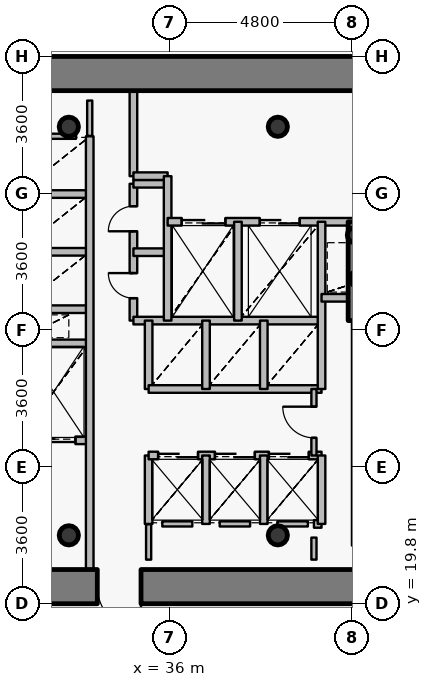
"""IFC4 building model, lengths in metres.
Left out: names, types, materials, properties, quantities, classifications, styles, units other than length and angle.
Written with IfcOpenShell. Run it as: python <this file> out.ifc"""

import sys

from ifc_helpers import new_model, si_unit, direction, frame, frame_2d, origin, origin_2d, place, context, subcontext, project, spatial, rectangle, hollow_circle, extrude, source, transform, mapped, element, fill, save


model = new_model("IFC4")
c1 = context("Model", 3, precision=1e-05, world=origin(), true_north=direction((0.0, 1.0)))
c2 = subcontext(c1, "Body", "Model", "MODEL_VIEW")
j1 = project(units=[si_unit("LENGTHUNIT", "METRE"), si_unit("PLANEANGLEUNIT", "RADIAN")], contexts=[c1])
p1 = place(None, origin())
s1 = spatial("IfcSite", under=j1, at=p1, CompositionType="ELEMENT")
p2 = place(p1, origin())
s2 = spatial("IfcBuilding", under=s1, at=p2, CompositionType="ELEMENT")
p3 = place(p2, frame((0.0, 0.0, 70.2)))
s3 = spatial("IfcBuildingStorey", under=s2, at=p3, CompositionType="ELEMENT", Elevation=70.2)
for number, where, z_axis, x_axis in (
    (1, (33.35, 21.6, 0.0), (0.0, 0.0, 1.0), (1.0, 0.0, 0.0)),
    (2, (38.85, 21.6, 0.0), (0.0, 0.0, 1.0), (1.0, 0.0, 0.0)),
    (3, (38.85, 32.35, 0.0), (0.0, 0.0, 1.0), (1.0, 0.0, 0.0)),
    (4, (33.35, 32.35, 0.0), (0.0, 0.0, 1.0), (1.0, 0.0, 0.0)),
):
    element("IfcColumn", number, at=place(p3, frame(where, z_axis=z_axis, x_axis=x_axis)), inside=s3, PredefinedType="COLUMN", context=c2, shape_type="SweptSolid", body=[
        extrude(hollow_circle(Radius=0.254, WallThickness=0.02, at=origin_2d()), origin(), (0.0, 0.0, 1.0), 4.2),
    ])
for number, where, z_axis, x_axis in (
    (5, (40.95, 28.35, 0.0), (0.0, 0.0, 1.0), (1.0, 0.0, 0.0)),
    (6, (40.88, 29.5, 0.0), (0.0, 0.0, 1.0), (1.0, 0.0, 0.0)),
):
    element("IfcColumn", number, at=place(p3, frame(where, z_axis=z_axis, x_axis=x_axis)), inside=s3, PredefinedType="COLUMN", context=c2, shape_type="SweptSolid", body=[
        extrude(hollow_circle(Radius=0.203, WallThickness=0.016, at=origin_2d()), origin(), (0.0, 0.0, 1.0), 4.2),
    ])
p4 = place(p3, frame((26.75, 33.75, 0.0), z_axis=(0.0, 0.0, 1.0), x_axis=(1.0, 0.0, 0.0)))
e7 = element("IfcWall", 7, at=p4, inside=s3, PredefinedType="SHEAR", context=c2, shape_type="SweptSolid", body=[
    extrude(rectangle(XDim=18.5, YDim=0.9, at=frame_2d((9.25, 0.0))), origin(), (0.0, 0.0, 1.0), 3.4),
])
p5 = place(p3, frame((45.25, 20.25, 0.0), z_axis=(0.0, 0.0, 1.0), x_axis=(-1.0, 0.0, 0.0)))
e8 = element("IfcWall", 8, at=p5, inside=s3, PredefinedType="SHEAR", context=c2, shape_type="SweptSolid", body=[
    extrude(rectangle(XDim=18.5, YDim=0.9, at=frame_2d((9.25, 0.0))), origin(), (0.0, 0.0, 1.0), 3.4),
])
p6 = place(p5, frame((10.0, 0.0, 0.0)))
e9 = element("IfcOpeningElement", 9, at=p6, cuts=e8, PredefinedType="OPENING", context=c2, shape_type="SweptSolid", body=[
    extrude(rectangle(XDim=1.15, YDim=2.15, at=origin_2d()), frame((0.575, 0.46, 1.075), z_axis=(0.0, -1.0, 0.0), x_axis=(1.0, 0.0, 0.0)), (0.0, 0.0, 1.0), 0.92),
])
p7 = place(p3, frame((40.9, 27.25, 0.0), z_axis=(0.0, 0.0, 1.0), x_axis=(0.0, 1.0, 0.0)))
e10 = element("IfcWall", 10, at=p7, inside=s3, PredefinedType="SHEAR", context=c2, shape_type="SweptSolid", body=[
    extrude(rectangle(XDim=2.6, YDim=0.4, at=frame_2d((1.3, 0.0))), origin(), (0.0, 0.0, 1.0), 3.55),
])
p8 = place(p3, frame((32.0, 24.1, 0.0), z_axis=(0.0, 0.0, 1.0), x_axis=(1.0, 0.0, 0.0)))
e11 = element("IfcWall", 11, at=p8, inside=s3, PredefinedType="PARTITIONING", context=c2, shape_type="SweptSolid", body=[
    extrude(rectangle(XDim=1.9, YDim=0.2, at=frame_2d((0.95, 0.0))), origin(), (0.0, 0.0, 1.0), 3.535),
])
p9 = place(p8, frame((0.375, 0.0, 0.0)))
e12 = element("IfcOpeningElement", 12, at=p9, cuts=e11, PredefinedType="OPENING", context=c2, shape_type="SweptSolid", body=[
    extrude(rectangle(XDim=1.15, YDim=2.15, at=origin_2d()), frame((0.575, 0.11, 1.075), z_axis=(0.0, -1.0, 0.0), x_axis=(1.0, 0.0, 0.0)), (0.0, 0.0, 1.0), 0.22),
])
for number, where, z_axis, x_axis in (
    (13, (32.0, 26.65, 0.0), (0.0, 0.0, 1.0), (1.0, 0.0, 0.0)),
    (14, (32.0, 27.55, 0.0), (0.0, 0.0, 1.0), (1.0, 0.0, 0.0)),
    (15, (32.0, 29.06, 0.0), (0.0, 0.0, 1.0), (1.0, 0.0, 0.0)),
    (16, (32.0, 30.58, 0.0), (0.0, 0.0, 1.0), (1.0, 0.0, 0.0)),
):
    element("IfcWall", number, at=place(p3, frame(where, z_axis=z_axis, x_axis=x_axis)), inside=s3, PredefinedType="PARTITIONING", context=c2, shape_type="SweptSolid", body=[
        extrude(rectangle(XDim=1.9, YDim=0.2, at=frame_2d((0.95, 0.0))), origin(), (0.0, 0.0, 1.0), 3.535),
    ])
p10 = place(p3, frame((33.9, 20.7, 0.0), z_axis=(0.0, 0.0, 1.0), x_axis=(0.0, 1.0, 0.0)))
e17 = element("IfcWall", 17, at=p10, inside=s3, PredefinedType="PARTITIONING", context=c2, shape_type="SweptSolid", body=[
    extrude(rectangle(XDim=11.4, YDim=0.2, at=frame_2d((5.7, 0.0))), origin(), (0.0, 0.0, 1.0), 3.535),
])
p11 = place(p3, frame((35.05, 27.25, 0.0), z_axis=(0.0, 0.0, 1.0), x_axis=(0.0, 1.0, 0.0)))
e18 = element("IfcWall", 18, at=p11, inside=s3, PredefinedType="PARTITIONING", context=c2, shape_type="SweptSolid", body=[
    extrude(rectangle(XDim=3.6, YDim=0.2, at=frame_2d((1.8, 0.0))), origin(), (0.0, 0.0, 1.0), 3.95),
])
p12 = place(p11, frame((0.59, 0.0, 0.0)))
e19 = element("IfcOpeningElement", 19, at=p12, cuts=e18, PredefinedType="OPENING", context=c2, shape_type="SweptSolid", body=[
    extrude(rectangle(XDim=0.66, YDim=2.05, at=origin_2d()), frame((0.33, 0.11, 1.025), z_axis=(0.0, -1.0, 0.0), x_axis=(1.0, 0.0, 0.0)), (0.0, 0.0, 1.0), 0.22),
])
p13 = place(p11, frame((2.35, 0.0, 0.0)))
e20 = element("IfcOpeningElement", 20, at=p13, cuts=e18, PredefinedType="OPENING", context=c2, shape_type="SweptSolid", body=[
    extrude(rectangle(XDim=0.66, YDim=2.05, at=origin_2d()), frame((0.33, 0.11, 1.025), z_axis=(0.0, -1.0, 0.0), x_axis=(1.0, 0.0, 0.0)), (0.0, 0.0, 1.0), 0.22),
])
p14 = place(p3, frame((35.05, 27.25, 0.0), z_axis=(0.0, 0.0, 1.0), x_axis=(1.0, 0.0, 0.0)))
e21 = element("IfcWall", 21, at=p14, inside=s3, PredefinedType="PARTITIONING", context=c2, shape_type="SweptSolid", body=[
    extrude(rectangle(XDim=4.95, YDim=0.2, at=frame_2d((2.475, 0.0))), origin(), (0.0, 0.0, 1.0), 3.535),
])
for number, where, z_axis, x_axis in (
    (22, (35.05, 29.05, 0.0), (0.0, 0.0, 1.0), (1.0, 0.0, 0.0)),
    (23, (35.05, 30.85, 0.0), (0.0, 0.0, 1.0), (1.0, 0.0, 0.0)),
):
    element("IfcWall", number, at=place(p3, frame(where, z_axis=z_axis, x_axis=x_axis)), inside=s3, PredefinedType="PARTITIONING", context=c2, shape_type="SweptSolid", body=[
        extrude(rectangle(XDim=0.9, YDim=0.2, at=frame_2d((0.45, 0.0))), origin(), (0.0, 0.0, 1.0), 3.95),
    ])
p15 = place(p3, frame((35.05, 31.05, 0.0), z_axis=(0.0, 0.0, 1.0), x_axis=(0.0, 1.0, 0.0)))
e24 = element("IfcWall", 24, at=p15, inside=s3, PredefinedType="PARTITIONING", context=c2, shape_type="SweptSolid", body=[
    extrude(rectangle(XDim=2.25, YDim=0.2, at=frame_2d((1.125, 0.0))), origin(), (0.0, 0.0, 1.0), 3.535),
])
p16 = place(p3, frame((35.05, 31.05, 0.0), z_axis=(0.0, 0.0, 1.0), x_axis=(1.0, 0.0, 0.0)))
e25 = element("IfcWall", 25, at=p16, inside=s3, PredefinedType="PARTITIONING", context=c2, shape_type="SweptSolid", body=[
    extrude(rectangle(XDim=0.9, YDim=0.2, at=frame_2d((0.45, 0.0))), origin(), (0.0, 0.0, 1.0), 3.95),
])
p17 = place(p3, frame((35.45, 21.9, 0.0), z_axis=(0.0, 0.0, 1.0), x_axis=(0.0, 1.0, 0.0)))
e26 = element("IfcWall", 26, at=p17, inside=s3, PredefinedType="PARTITIONING", context=c2, shape_type="SweptSolid", body=[
    extrude(rectangle(XDim=1.8, YDim=0.2, at=frame_2d((0.9, 0.0))), origin(), (0.0, 0.0, 1.0), 3.95),
])
p18 = place(p3, frame((35.45, 23.7, 0.0), z_axis=(0.0, 0.0, 1.0), x_axis=(1.0, 0.0, 0.0)))
e27 = element("IfcWall", 27, at=p18, inside=s3, PredefinedType="PARTITIONING", context=c2, shape_type="SweptSolid", body=[
    extrude(rectangle(XDim=4.55, YDim=0.2, at=frame_2d((2.275, 0.0))), origin(), (0.0, 0.0, 1.0), 3.535),
])
p19 = place(p18, frame((0.25, 0.0, 0.0)))
e28 = element("IfcOpeningElement", 28, at=p19, cuts=e27, PredefinedType="OPENING", context=c2, shape_type="SweptSolid", body=[
    extrude(rectangle(XDim=1.05, YDim=2.15, at=origin_2d()), frame((0.525, 0.11, 1.075), z_axis=(0.0, -1.0, 0.0), x_axis=(1.0, 0.0, 0.0)), (0.0, 0.0, 1.0), 0.22),
])
p20 = place(p18, frame((1.745, 0.0, 0.0)))
e29 = element("IfcOpeningElement", 29, at=p20, cuts=e27, PredefinedType="OPENING", context=c2, shape_type="SweptSolid", body=[
    extrude(rectangle(XDim=1.05, YDim=2.15, at=origin_2d()), frame((0.525, 0.11, 1.075), z_axis=(0.0, -1.0, 0.0), x_axis=(1.0, 0.0, 0.0)), (0.0, 0.0, 1.0), 0.22),
])
p21 = place(p18, frame((3.165, 0.0, 0.0)))
e30 = element("IfcOpeningElement", 30, at=p21, cuts=e27, PredefinedType="OPENING", context=c2, shape_type="SweptSolid", body=[
    extrude(rectangle(XDim=1.05, YDim=2.15, at=origin_2d()), frame((0.525, 0.11, 1.075), z_axis=(0.0, -1.0, 0.0), x_axis=(1.0, 0.0, 0.0)), (0.0, 0.0, 1.0), 0.22),
])
p22 = place(p3, frame((35.45, 25.45, 0.0), z_axis=(0.0, 0.0, 1.0), x_axis=(0.0, 1.0, 0.0)))
e31 = element("IfcWall", 31, at=p22, inside=s3, PredefinedType="PARTITIONING", context=c2, shape_type="SweptSolid", body=[
    extrude(rectangle(XDim=1.8, YDim=0.2, at=frame_2d((0.9, 0.0))), origin(), (0.0, 0.0, 1.0), 3.95),
])
p23 = place(p3, frame((35.45, 25.45, 0.0), z_axis=(0.0, 0.0, 1.0), x_axis=(1.0, 0.0, 0.0)))
e32 = element("IfcWall", 32, at=p23, inside=s3, PredefinedType="PARTITIONING", context=c2, shape_type="SweptSolid", body=[
    extrude(rectangle(XDim=4.55, YDim=0.2, at=frame_2d((2.275, 0.0))), origin(), (0.0, 0.0, 1.0), 3.535),
])
p24 = place(p3, frame((35.95, 27.25, 0.0), z_axis=(0.0, 0.0, 1.0), x_axis=(0.0, 1.0, 0.0)))
e33 = element("IfcWall", 33, at=p24, inside=s3, PredefinedType="PARTITIONING", context=c2, shape_type="SweptSolid", body=[
    extrude(rectangle(XDim=3.8, YDim=0.2, at=frame_2d((1.9, 0.0))), origin(), (0.0, 0.0, 1.0), 3.95),
])
p25 = place(p3, frame((35.95, 29.85, 0.0), z_axis=(0.0, 0.0, 1.0), x_axis=(1.0, 0.0, 0.0)))
e34 = element("IfcWall", 34, at=p25, inside=s3, PredefinedType="PARTITIONING", context=c2, shape_type="SweptSolid", body=[
    extrude(rectangle(XDim=8.49, YDim=0.2, at=frame_2d((4.245, 0.0))), origin(), (0.0, 0.0, 1.0), 3.535),
])
p26 = place(p25, frame((6.1, 0.0, 0.0)))
e35 = element("IfcOpeningElement", 35, at=p26, cuts=e34, PredefinedType="OPENING", context=c2, shape_type="SweptSolid", body=[
    extrude(rectangle(XDim=1.2, YDim=2.15, at=origin_2d()), frame((0.6, 0.11, 1.075), z_axis=(0.0, -1.0, 0.0), x_axis=(1.0, 0.0, 0.0)), (0.0, 0.0, 1.0), 0.22),
])
p27 = place(p25, frame((0.37, 0.0, 0.0)))
e36 = element("IfcOpeningElement", 36, at=p27, cuts=e34, PredefinedType="OPENING", context=c2, shape_type="SweptSolid", body=[
    extrude(rectangle(XDim=1.15, YDim=2.15, at=origin_2d()), frame((0.575, 0.11, 1.075), z_axis=(0.0, -1.0, 0.0), x_axis=(1.0, 0.0, 0.0)), (0.0, 0.0, 1.0), 0.22),
])
p28 = place(p25, frame((2.425, 0.0, 0.0)))
e37 = element("IfcOpeningElement", 37, at=p28, cuts=e34, PredefinedType="OPENING", context=c2, shape_type="SweptSolid", body=[
    extrude(rectangle(XDim=1.05, YDim=2.15, at=origin_2d()), frame((0.525, 0.11, 1.075), z_axis=(0.0, -1.0, 0.0), x_axis=(1.0, 0.0, 0.0)), (0.0, 0.0, 1.0), 0.22),
])
for number, where, z_axis, x_axis in (
    (38, (36.96, 21.9, 0.0), (0.0, 0.0, 1.0), (0.0, 1.0, 0.0)),
    (39, (36.96, 25.45, 0.0), (0.0, 0.0, 1.0), (0.0, 1.0, 0.0)),
):
    element("IfcWall", number, at=place(p3, frame(where, z_axis=z_axis, x_axis=x_axis)), inside=s3, PredefinedType="PARTITIONING", context=c2, shape_type="SweptSolid", body=[
        extrude(rectangle(XDim=1.8, YDim=0.2, at=frame_2d((0.9, 0.0))), origin(), (0.0, 0.0, 1.0), 3.95),
    ])
p29 = place(p3, frame((37.8, 27.25, 0.0), z_axis=(0.0, 0.0, 1.0), x_axis=(0.0, 1.0, 0.0)))
e40 = element("IfcWall", 40, at=p29, inside=s3, PredefinedType="PARTITIONING", context=c2, shape_type="SweptSolid", body=[
    extrude(rectangle(XDim=2.6, YDim=0.2, at=frame_2d((1.3, 0.0))), origin(), (0.0, 0.0, 1.0), 3.95),
])
for number, where, z_axis, x_axis in (
    (41, (38.48, 21.9, 0.0), (0.0, 0.0, 1.0), (0.0, 1.0, 0.0)),
    (42, (38.48, 25.45, 0.0), (0.0, 0.0, 1.0), (0.0, 1.0, 0.0)),
):
    element("IfcWall", number, at=place(p3, frame(where, z_axis=z_axis, x_axis=x_axis)), inside=s3, PredefinedType="PARTITIONING", context=c2, shape_type="SweptSolid", body=[
        extrude(rectangle(XDim=1.8, YDim=0.2, at=frame_2d((0.9, 0.0))), origin(), (0.0, 0.0, 1.0), 3.95),
    ])
p30 = place(p3, frame((39.8, 21.9, 0.0), z_axis=(0.0, 0.0, 1.0), x_axis=(1.0, 0.0, 0.0)))
e43 = element("IfcWall", 43, at=p30, inside=s3, PredefinedType="PARTITIONING", context=c2, shape_type="SweptSolid", body=[
    extrude(rectangle(XDim=0.2, YDim=0.2, at=frame_2d((0.1, 0.0))), origin(), (0.0, 0.0, 1.0), 3.95),
])
p31 = place(p3, frame((39.8, 23.7, 0.0), z_axis=(0.0, 0.0, 1.0), x_axis=(0.0, 1.0, 0.0)))
e44 = element("IfcWall", 44, at=p31, inside=s3, PredefinedType="PARTITIONING", context=c2, shape_type="SweptSolid", body=[
    extrude(rectangle(XDim=1.75, YDim=0.135, at=frame_2d((0.875, 0.0))), origin(), (0.0, 0.0, 1.0), 3.95),
])
p32 = place(p31, frame((0.465, 0.0, 0.0)))
e45 = element("IfcOpeningElement", 45, at=p32, cuts=e44, PredefinedType="OPENING", context=c2, shape_type="SweptSolid", body=[
    extrude(rectangle(XDim=0.82, YDim=2.1, at=origin_2d()), frame((0.41, 0.078, 1.05), z_axis=(0.0, -1.0, 0.0), x_axis=(1.0, 0.0, 0.0)), (0.0, 0.0, 1.0), 0.155),
])
p33 = place(p3, frame((40.0, 21.9, 0.0), z_axis=(0.0, 0.0, 1.0), x_axis=(0.0, 1.0, 0.0)))
e46 = element("IfcWall", 46, at=p33, inside=s3, PredefinedType="PARTITIONING", context=c2, shape_type="SweptSolid", body=[
    extrude(rectangle(XDim=1.8, YDim=0.2, at=frame_2d((0.9, 0.0))), origin(), (0.0, 0.0, 1.0), 3.95),
])
p34 = place(p3, frame((40.0, 25.45, 0.0), z_axis=(0.0, 0.0, 1.0), x_axis=(0.0, 1.0, 0.0)))
e47 = element("IfcWall", 47, at=p34, inside=s3, PredefinedType="PARTITIONING", context=c2, shape_type="SweptSolid", body=[
    extrude(rectangle(XDim=4.4, YDim=0.2, at=frame_2d((2.2, 0.0))), origin(), (0.0, 0.0, 1.0), 3.95),
])
p35 = place(p3, frame((40.0, 27.85, 0.0), z_axis=(0.0, 0.0, 1.0), x_axis=(1.0, 0.0, 0.0)))
e48 = element("IfcWall", 48, at=p35, inside=s3, PredefinedType="PARTITIONING", context=c2, shape_type="SweptSolid", body=[
    extrude(rectangle(XDim=0.9, YDim=0.2, at=frame_2d((0.45, 0.0))), origin(), (0.0, 0.0, 1.0), 3.95),
])
p36 = place(p3, frame((40.9, 21.33, 0.0), z_axis=(0.0, 0.0, 1.0), x_axis=(0.0, 1.0, 0.0)))
e49 = element("IfcWall", 49, at=p36, inside=s3, PredefinedType="PARTITIONING", context=c2, shape_type="SweptSolid", body=[
    extrude(rectangle(XDim=5.91, YDim=0.2, at=frame_2d((2.955, 0.0))), origin(), (0.0, 0.0, 1.0), 3.485),
])
p37 = place(p3, frame((36.6, 21.9, 0.0), z_axis=(0.0, 0.0, 1.0), x_axis=(-1.0, 0.0, 0.0)))
e50 = element("IfcWall", 50, at=p37, inside=s3, PredefinedType="PARTITIONING", context=c2, shape_type="SweptSolid", body=[
    extrude(rectangle(XDim=0.79, YDim=0.135, at=frame_2d((0.395, 0.0))), origin(), (0.0, 0.0, 1.0), 3.95),
])
p38 = place(p3, frame((38.12, 21.9, 0.0), z_axis=(0.0, 0.0, 1.0), x_axis=(-1.0, 0.0, 0.0)))
e51 = element("IfcWall", 51, at=p38, inside=s3, PredefinedType="PARTITIONING", context=c2, shape_type="SweptSolid", body=[
    extrude(rectangle(XDim=0.8, YDim=0.135, at=frame_2d((0.4, 0.0))), origin(), (0.0, 0.0, 1.0), 3.95),
])
p39 = place(p3, frame((39.64, 21.9, 0.0), z_axis=(0.0, 0.0, 1.0), x_axis=(-1.0, 0.0, 0.0)))
e52 = element("IfcWall", 52, at=p39, inside=s3, PredefinedType="PARTITIONING", context=c2, shape_type="SweptSolid", body=[
    extrude(rectangle(XDim=0.8, YDim=0.135, at=frame_2d((0.4, 0.0))), origin(), (0.0, 0.0, 1.0), 3.535),
])
p40 = place(p3, frame((32.36, 32.1, 0.0), z_axis=(0.0, 0.0, 1.0), x_axis=(1.0, 0.0, 0.0)))
e53 = element("IfcWall", 53, at=p40, inside=s3, PredefinedType="PARTITIONING", context=c2, shape_type="SweptSolid", body=[
    extrude(rectangle(XDim=1.18, YDim=0.135, at=frame_2d((0.59, 0.0))), origin(), (0.0, 0.0, 1.0), 3.535),
])
p41 = place(p3, frame((39.8, 20.96, 0.0), z_axis=(0.0, 0.0, 1.0), x_axis=(0.0, 1.0, 0.0)))
e54 = element("IfcWall", 54, at=p41, inside=s3, PredefinedType="PARTITIONING", context=c2, shape_type="SweptSolid", body=[
    extrude(rectangle(XDim=0.58, YDim=0.135, at=frame_2d((0.29, 0.0))), origin(), (0.0, 0.0, 1.0), 3.485),
])
for number, where, z_axis, x_axis in (
    (55, (35.45, 21.89, 0.0), (0.0, 0.0, 1.0), (0.0, -1.0, 0.0)),
    (56, (33.9, 32.11, 0.0), (0.0, 0.0, 1.0), (0.0, 1.0, 0.0)),
):
    element("IfcWall", number, at=place(p3, frame(where, z_axis=z_axis, x_axis=x_axis)), inside=s3, PredefinedType="PARTITIONING", context=c2, shape_type="SweptSolid", body=[
        extrude(rectangle(XDim=0.93, YDim=0.135, at=frame_2d((0.465, 0.0))), origin(), (0.0, 0.0, 1.0), 3.535),
    ])
m1 = source(origin(), c2, "Body", "SweptSolid", [
    extrude(rectangle(XDim=1.15, YDim=2.15, at=origin_2d()), frame((0.575, 0.025, 1.075), z_axis=(0.0, -1.0, 0.0), x_axis=(1.0, 0.0, 0.0)), (0.0, 0.0, 1.0), 0.05),
])
p42 = place(p6, origin())
e57 = element("IfcDoor", 57, at=p42, inside=s3, OperationType="SINGLE_SWING_LEFT", PredefinedType="DOOR", context=c2, shape_type="MappedRepresentation", body=[
    mapped(m1, transform((0.0, 0.0, 0.0), x_axis=(1.0, 0.0, 0.0), y_axis=(0.0, 1.0, 0.0), z_axis=(0.0, 0.0, 1.0), scale=1.0)),
])
fill(e9, e57)
m2 = source(origin(), c2, "Body", "SweptSolid", [
    extrude(rectangle(XDim=1.15, YDim=2.15, at=origin_2d()), frame((0.575, 0.025, 1.075), z_axis=(0.0, -1.0, 0.0), x_axis=(1.0, 0.0, 0.0)), (0.0, 0.0, 1.0), 0.05),
])
p43 = place(p27, origin())
e58 = element("IfcDoor", 58, at=p43, inside=s3, OperationType="DOUBLE_DOOR_SLIDING", PredefinedType="USERDEFINED", context=c2, shape_type="MappedRepresentation", body=[
    mapped(m2, transform((0.0, 0.0, 0.0), x_axis=(1.0, 0.0, 0.0), y_axis=(0.0, 1.0, 0.0), z_axis=(0.0, 0.0, 1.0), scale=1.0)),
])
fill(e36, e58)
p44 = place(p9, origin())
e59 = element("IfcDoor", 59, at=p44, inside=s3, OperationType="DOUBLE_DOOR_SLIDING", PredefinedType="USERDEFINED", context=c2, shape_type="MappedRepresentation", body=[
    mapped(m2, transform((0.0, 0.0, 0.0), x_axis=(1.0, 0.0, 0.0), y_axis=(0.0, 1.0, 0.0), z_axis=(0.0, 0.0, 1.0), scale=1.0)),
])
fill(e12, e59)
m3 = source(origin(), c2, "Body", "SweptSolid", [
    extrude(rectangle(XDim=1.05, YDim=2.15, at=origin_2d()), frame((0.525, 0.025, 1.075), z_axis=(0.0, -1.0, 0.0), x_axis=(1.0, 0.0, 0.0)), (0.0, 0.0, 1.0), 0.05),
])
p45 = place(p28, origin())
e60 = element("IfcDoor", 60, at=p45, inside=s3, OperationType="DOUBLE_DOOR_SLIDING", PredefinedType="USERDEFINED", context=c2, shape_type="MappedRepresentation", body=[
    mapped(m3, transform((0.0, 0.0, 0.0), x_axis=(1.0, 0.0, 0.0), y_axis=(0.0, 1.0, 0.0), z_axis=(0.0, 0.0, 1.0), scale=1.0)),
])
fill(e37, e60)
p46 = place(p19, origin())
e61 = element("IfcDoor", 61, at=p46, inside=s3, OperationType="DOUBLE_DOOR_SLIDING", PredefinedType="USERDEFINED", context=c2, shape_type="MappedRepresentation", body=[
    mapped(m3, transform((0.0, 0.0, 0.0), x_axis=(1.0, 0.0, 0.0), y_axis=(0.0, 1.0, 0.0), z_axis=(0.0, 0.0, 1.0), scale=1.0)),
])
fill(e28, e61)
p47 = place(p20, origin())
e62 = element("IfcDoor", 62, at=p47, inside=s3, OperationType="DOUBLE_DOOR_SLIDING", PredefinedType="USERDEFINED", context=c2, shape_type="MappedRepresentation", body=[
    mapped(m3, transform((0.0, 0.0, 0.0), x_axis=(1.0, 0.0, 0.0), y_axis=(0.0, 1.0, 0.0), z_axis=(0.0, 0.0, 1.0), scale=1.0)),
])
fill(e29, e62)
p48 = place(p21, origin())
e63 = element("IfcDoor", 63, at=p48, inside=s3, OperationType="DOUBLE_DOOR_SLIDING", PredefinedType="USERDEFINED", context=c2, shape_type="MappedRepresentation", body=[
    mapped(m3, transform((0.0, 0.0, 0.0), x_axis=(1.0, 0.0, 0.0), y_axis=(0.0, 1.0, 0.0), z_axis=(0.0, 0.0, 1.0), scale=1.0)),
])
fill(e30, e63)
m4 = source(origin(), c2, "Body", "SweptSolid", [
    extrude(rectangle(XDim=0.66, YDim=2.05, at=origin_2d()), frame((0.33, 0.025, 1.025), z_axis=(0.0, -1.0, 0.0), x_axis=(1.0, 0.0, 0.0)), (0.0, 0.0, 1.0), 0.05),
])
p49 = place(p12, origin())
e64 = element("IfcDoor", 64, at=p49, inside=s3, OperationType="SINGLE_SWING_RIGHT", PredefinedType="USERDEFINED", context=c2, shape_type="MappedRepresentation", body=[
    mapped(m4, transform((0.0, 0.0, 0.0), x_axis=(1.0, 0.0, 0.0), y_axis=(0.0, 1.0, 0.0), z_axis=(0.0, 0.0, 1.0), scale=1.0)),
])
fill(e19, e64)
p50 = place(p13, origin())
e65 = element("IfcDoor", 65, at=p50, inside=s3, OperationType="SINGLE_SWING_LEFT", PredefinedType="USERDEFINED", context=c2, shape_type="MappedRepresentation", body=[
    mapped(m4, transform((0.0, 0.0, 0.0), x_axis=(1.0, 0.0, 0.0), y_axis=(0.0, 1.0, 0.0), z_axis=(0.0, 0.0, 1.0), scale=1.0)),
])
fill(e20, e65)
m5 = source(origin(), c2, "Body", "SweptSolid", [
    extrude(rectangle(XDim=0.82, YDim=2.1, at=origin_2d()), frame((0.41, 0.025, 1.05), z_axis=(0.0, -1.0, 0.0), x_axis=(1.0, 0.0, 0.0)), (0.0, 0.0, 1.0), 0.05),
])
p51 = place(p32, origin())
e66 = element("IfcDoor", 66, at=p51, inside=s3, OperationType="SINGLE_SWING_RIGHT", PredefinedType="DOOR", context=c2, shape_type="MappedRepresentation", body=[
    mapped(m5, transform((0.0, 0.0, 0.0), x_axis=(1.0, 0.0, 0.0), y_axis=(0.0, 1.0, 0.0), z_axis=(0.0, 0.0, 1.0), scale=1.0)),
])
fill(e45, e66)
save(model, sys.argv[1])
